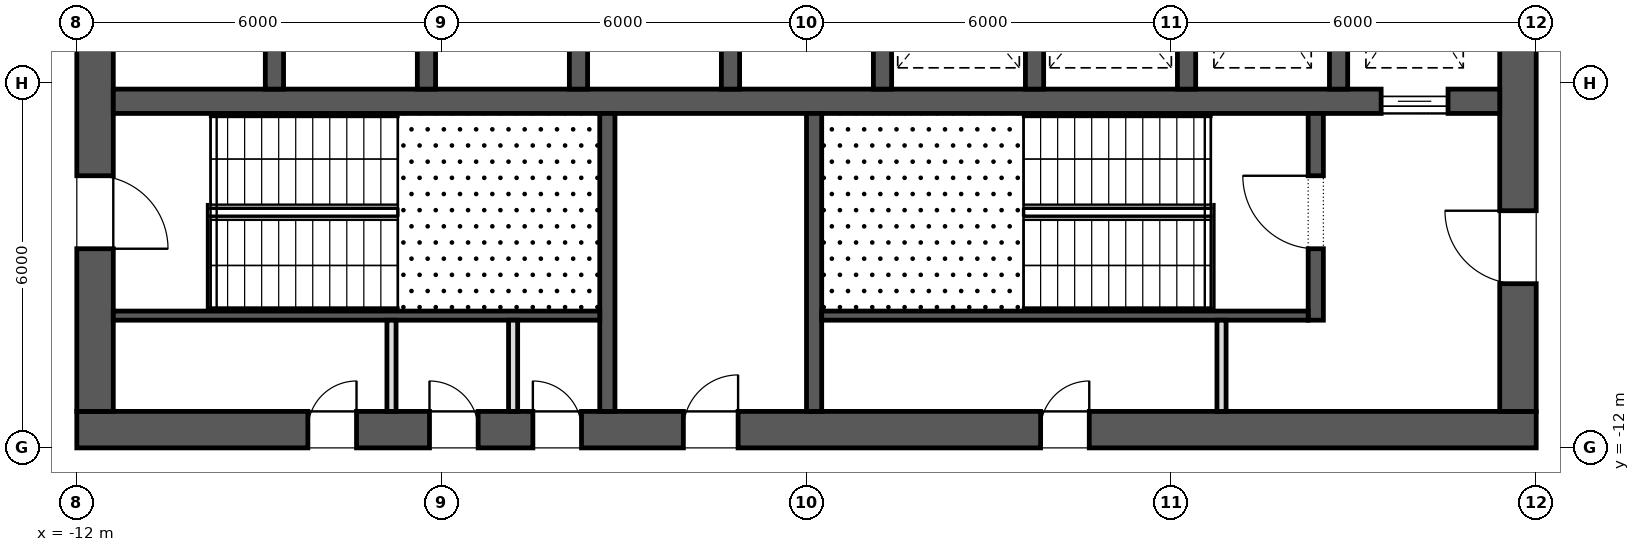
"""IFC4 building model, lengths in metres.
Left out: names, types, materials, properties, quantities, classifications, styles, units other than length and angle.
Written with IfcOpenShell. Run it as: python <this file> out.ifc"""

import sys

from ifc_helpers import new_model, si_unit, direction, frame, frame_2d, origin, place, context, subcontext, project, spatial, rectangle, extrude, element, fill, save


model = new_model("IFC4")
c1 = context("Model", 3, precision=1e-05, world=origin(), true_north=direction((0.0, 1.0)))
c2 = subcontext(c1, "Body", "Model", "MODEL_VIEW")
j1 = project(units=[si_unit("LENGTHUNIT", "METRE"), si_unit("PLANEANGLEUNIT", "RADIAN")], contexts=[c1])
p1 = place(None, origin())
s1 = spatial("IfcSite", under=j1, at=p1, CompositionType="ELEMENT")
p2 = place(p1, origin())
s2 = spatial("IfcBuilding", under=s1, at=p2, CompositionType="ELEMENT")
p3 = place(p2, frame((0.0, 0.0, 61.3)))
s3 = spatial("IfcBuildingStorey", under=s2, at=p3, CompositionType="ELEMENT", Elevation=61.3)
p4 = place(p3, frame((-12.0, -11.7, 0.0), z_axis=(0.0, 0.0, 1.0), x_axis=(1.0, 0.0, 0.0)))
e1 = element("IfcWall", 1, at=p4, inside=s3, PredefinedType="SHEAR", context=c2, shape_type="SweptSolid", body=[
    extrude(rectangle(XDim=24.0, YDim=0.6, at=frame_2d((12.0, 0.0))), origin(), (0.0, 0.0, 1.0), 4.2),
])
p5 = place(p4, frame((9.975, 0.0, 0.0)))
e2 = element("IfcOpeningElement", 2, at=p5, cuts=e1, PredefinedType="OPENING", context=c2, shape_type="SweptSolid", body=[
    extrude(rectangle(XDim=0.9, YDim=2.1, at=frame_2d((0.45, 1.05))), frame((0.0, 0.312, 0.0), z_axis=(0.0, -1.0, 0.0), x_axis=(1.0, 0.0, 0.0)), (0.0, 0.0, 1.0), 0.624),
])
p6 = place(p4, frame((3.8, 0.0, 0.0)))
e3 = element("IfcOpeningElement", 3, at=p6, cuts=e1, PredefinedType="OPENING", context=c2, shape_type="SweptSolid", body=[
    extrude(rectangle(XDim=0.8, YDim=2.1, at=frame_2d((0.4, 1.05))), frame((0.0, 0.312, 0.0), z_axis=(0.0, -1.0, 0.0), x_axis=(1.0, 0.0, 0.0)), (0.0, 0.0, 1.0), 0.624),
])
p7 = place(p4, frame((5.8, 0.0, 0.0)))
e4 = element("IfcOpeningElement", 4, at=p7, cuts=e1, PredefinedType="OPENING", context=c2, shape_type="SweptSolid", body=[
    extrude(rectangle(XDim=0.8, YDim=2.1, at=frame_2d((0.4, 1.05))), frame((0.0, 0.312, 0.0), z_axis=(0.0, -1.0, 0.0), x_axis=(1.0, 0.0, 0.0)), (0.0, 0.0, 1.0), 0.624),
])
p8 = place(p4, frame((7.5, 0.0, 0.0)))
e5 = element("IfcOpeningElement", 5, at=p8, cuts=e1, PredefinedType="OPENING", context=c2, shape_type="SweptSolid", body=[
    extrude(rectangle(XDim=0.8, YDim=2.1, at=frame_2d((0.4, 1.05))), frame((0.0, 0.312, 0.0), z_axis=(0.0, -1.0, 0.0), x_axis=(1.0, 0.0, 0.0)), (0.0, 0.0, 1.0), 0.624),
])
p9 = place(p4, frame((15.85, 0.0, 0.0)))
e6 = element("IfcOpeningElement", 6, at=p9, cuts=e1, PredefinedType="OPENING", context=c2, shape_type="SweptSolid", body=[
    extrude(rectangle(XDim=0.8, YDim=2.1, at=frame_2d((0.4, 1.05))), frame((0.0, 0.312, 0.0), z_axis=(0.0, -1.0, 0.0), x_axis=(1.0, 0.0, 0.0)), (0.0, 0.0, 1.0), 0.624),
])
p10 = place(p3, frame((11.7, -11.4, 0.0), z_axis=(0.0, 0.0, 1.0), x_axis=(0.0, 1.0, 0.0)))
e7 = element("IfcWall", 7, at=p10, inside=s3, PredefinedType="SHEAR", context=c2, shape_type="SweptSolid", body=[
    extrude(rectangle(XDim=22.8, YDim=0.6, at=frame_2d((11.4, 0.0))), origin(), (0.0, 0.0, 1.0), 4.2),
])
p11 = place(p10, frame((10.2, 0.0, 0.0)))
e8 = element("IfcOpeningElement", 8, at=p11, cuts=e7, PredefinedType="OPENING", context=c2, shape_type="SweptSolid", body=[
    extrude(rectangle(XDim=2.4, YDim=2.1, at=frame_2d((1.2, 1.05))), frame((0.0, 0.312, 0.0), z_axis=(0.0, -1.0, 0.0), x_axis=(1.0, 0.0, 0.0)), (0.0, 0.0, 1.0), 0.624),
])
p12 = place(p10, frame((19.5, 0.0, 0.0)))
e9 = element("IfcOpeningElement", 9, at=p12, cuts=e7, PredefinedType="OPENING", context=c2, shape_type="SweptSolid", body=[
    extrude(rectangle(XDim=1.2, YDim=2.1, at=frame_2d((0.6, 1.05))), frame((0.0, 0.312, 0.0), z_axis=(0.0, -1.0, 0.0), x_axis=(1.0, 0.0, 0.0)), (0.0, 0.0, 1.0), 0.624),
])
p13 = place(p10, frame((2.1, 0.0, 0.0)))
e10 = element("IfcOpeningElement", 10, at=p13, cuts=e7, PredefinedType="OPENING", context=c2, shape_type="SweptSolid", body=[
    extrude(rectangle(XDim=1.2, YDim=2.1, at=frame_2d((0.6, 1.05))), frame((0.0, 0.312, 0.0), z_axis=(0.0, -1.0, 0.0), x_axis=(1.0, 0.0, 0.0)), (0.0, 0.0, 1.0), 0.624),
])
p14 = place(p3, frame((-11.7, -11.4, 0.0), z_axis=(0.0, 0.0, 1.0), x_axis=(0.0, 1.0, 0.0)))
e11 = element("IfcWall", 11, at=p14, inside=s3, PredefinedType="SHEAR", context=c2, shape_type="SweptSolid", body=[
    extrude(rectangle(XDim=22.8, YDim=0.6, at=frame_2d((11.4, 0.0))), origin(), (0.0, 0.0, 1.0), 4.2),
])
p15 = place(p14, frame((10.2, 0.0, 0.0)))
e12 = element("IfcOpeningElement", 12, at=p15, cuts=e11, PredefinedType="OPENING", context=c2, shape_type="SweptSolid", body=[
    extrude(rectangle(XDim=2.4, YDim=2.1, at=frame_2d((1.2, 1.05))), frame((0.0, 0.312, 0.0), z_axis=(0.0, -1.0, 0.0), x_axis=(1.0, 0.0, 0.0)), (0.0, 0.0, 1.0), 0.624),
])
p16 = place(p14, frame((18.925, 0.0, 0.0)))
e13 = element("IfcOpeningElement", 13, at=p16, cuts=e11, PredefinedType="OPENING", context=c2, shape_type="SweptSolid", body=[
    extrude(rectangle(XDim=1.2, YDim=2.1, at=frame_2d((0.6, 1.05))), frame((0.0, 0.312, 0.0), z_axis=(0.0, -1.0, 0.0), x_axis=(1.0, 0.0, 0.0)), (0.0, 0.0, 1.0), 0.624),
])
p17 = place(p14, frame((2.675, 0.0, 0.0)))
e14 = element("IfcOpeningElement", 14, at=p17, cuts=e11, PredefinedType="OPENING", context=c2, shape_type="SweptSolid", body=[
    extrude(rectangle(XDim=1.2, YDim=2.1, at=frame_2d((0.6, 1.05))), frame((0.0, 0.312, 0.0), z_axis=(0.0, -1.0, 0.0), x_axis=(1.0, 0.0, 0.0)), (0.0, 0.0, 1.0), 0.624),
])
p18 = place(p3, frame((-11.4, -6.3, 0.0), z_axis=(0.0, 0.0, 1.0), x_axis=(1.0, 0.0, 0.0)))
e15 = element("IfcWall", 15, at=p18, inside=s3, PredefinedType="SHEAR", context=c2, shape_type="SweptSolid", body=[
    extrude(rectangle(XDim=22.8, YDim=0.4, at=frame_2d((11.4, 0.0))), origin(), (0.0, 0.0, 1.0), 4.2),
])
p19 = place(p18, frame((20.85, 0.0, 0.0)))
e16 = element("IfcOpeningElement", 16, at=p19, cuts=e15, PredefinedType="OPENING", context=c2, shape_type="SweptSolid", body=[
    extrude(rectangle(XDim=1.1, YDim=2.1, at=frame_2d((0.55, 1.05))), frame((0.0, 0.212, 0.0), z_axis=(0.0, -1.0, 0.0), x_axis=(1.0, 0.0, 0.0)), (0.0, 0.0, 1.0), 0.424),
])
for number, where, z_axis, x_axis in (
    (17, (-8.75, -6.1, 0.0), (0.0, 0.0, 1.0), (0.0, 1.0, 0.0)),
    (18, (-6.25, -6.1, 0.0), (0.0, 0.0, 1.0), (0.0, 1.0, 0.0)),
    (19, (-3.75, -6.1, 0.0), (0.0, 0.0, 1.0), (0.0, 1.0, 0.0)),
    (20, (-1.25, -6.1, 0.0), (0.0, 0.0, 1.0), (0.0, 1.0, 0.0)),
    (21, (1.25, -6.1, 0.0), (0.0, 0.0, 1.0), (0.0, 1.0, 0.0)),
    (22, (3.75, -6.1, 0.0), (0.0, 0.0, 1.0), (0.0, 1.0, 0.0)),
    (23, (6.25, -6.1, 0.0), (0.0, 0.0, 1.0), (0.0, 1.0, 0.0)),
    (24, (8.75, -6.1, 0.0), (0.0, 0.0, 1.0), (0.0, 1.0, 0.0)),
):
    element("IfcWall", number, at=place(p3, frame(where, z_axis=z_axis, x_axis=x_axis)), inside=s3, PredefinedType="SHEAR", context=c2, shape_type="SweptSolid", body=[
        extrude(rectangle(XDim=2.9, YDim=0.3, at=frame_2d((1.45, 0.0))), origin(), (0.0, 0.0, 1.0), 4.2),
    ])
for number, where, z_axis, x_axis in (
    (25, (-3.275, -11.4, 0.0), (0.0, 0.0, 1.0), (0.0, 1.0, 0.0)),
    (26, (0.125, -11.4, 0.0), (0.0, 0.0, 1.0), (0.0, 1.0, 0.0)),
):
    element("IfcWall", number, at=place(p3, frame(where, z_axis=z_axis, x_axis=x_axis)), inside=s3, PredefinedType="SHEAR", context=c2, shape_type="SweptSolid", body=[
        extrude(rectangle(XDim=4.9, YDim=0.25, at=frame_2d((2.45, 0.0))), origin(), (0.0, 0.0, 1.0), 3.9),
    ])
p20 = place(p3, frame((8.375, -9.9, 0.0), z_axis=(0.0, 0.0, 1.0), x_axis=(0.0, 1.0, 0.0)))
e27 = element("IfcWall", 27, at=p20, inside=s3, PredefinedType="SHEAR", context=c2, shape_type="SweptSolid", body=[
    extrude(rectangle(XDim=3.4, YDim=0.25, at=frame_2d((1.7, 0.0))), origin(), (0.0, 0.0, 1.0), 3.9),
])
p21 = place(p20, frame((1.175, 0.0, 0.0)))
e28 = element("IfcOpeningElement", 28, at=p21, cuts=e27, PredefinedType="OPENING", context=c2, shape_type="SweptSolid", body=[
    extrude(rectangle(XDim=1.2, YDim=2.1, at=frame_2d((0.6, 1.05))), frame((0.0, 0.137, 0.0), z_axis=(0.0, -1.0, 0.0), x_axis=(1.0, 0.0, 0.0)), (0.0, 0.0, 1.0), 0.274),
])
for number, where, z_axis, x_axis in (
    (29, (-11.4, -9.825, 0.0), (0.0, 0.0, 1.0), (1.0, 0.0, 0.0)),
    (30, (0.25, -9.825, 0.0), (0.0, 0.0, 1.0), (1.0, 0.0, 0.0)),
):
    element("IfcWall", number, at=place(p3, frame(where, z_axis=z_axis, x_axis=x_axis)), inside=s3, PredefinedType="SHEAR", context=c2, shape_type="SweptSolid", body=[
        extrude(rectangle(XDim=8.0, YDim=0.15, at=frame_2d((4.0, 0.0))), origin(), (0.0, 0.0, 1.0), 3.9),
    ])
for number, where, z_axis, x_axis in (
    (31, (-6.825, -11.4, 0.0), (0.0, 0.0, 1.0), (0.0, 1.0, 0.0)),
    (32, (-4.825, -11.4, 0.0), (0.0, 0.0, 1.0), (0.0, 1.0, 0.0)),
    (33, (6.825, -11.4, 0.0), (0.0, 0.0, 1.0), (0.0, 1.0, 0.0)),
):
    element("IfcWall", number, at=place(p3, frame(where, z_axis=z_axis, x_axis=x_axis)), inside=s3, PredefinedType="PARTITIONING", context=c2, shape_type="SweptSolid", body=[
        extrude(rectangle(XDim=1.5, YDim=0.15, at=frame_2d((0.75, 0.0))), origin(), (0.0, 0.0, 1.0), 3.9),
    ])
p22 = place(p19, origin())
e34 = element("IfcDoor", 34, at=p22, inside=s3, OperationType="SLIDING_TO_LEFT", PredefinedType="DOOR", context=c2, shape_type="SweptSolid", body=[
    extrude(rectangle(XDim=1.1, YDim=2.1, at=frame_2d((0.55, 1.05))), frame((0.0, 0.025, 0.0), z_axis=(0.0, -1.0, 0.0), x_axis=(1.0, 0.0, 0.0)), (0.0, 0.0, 1.0), 0.05),
])
fill(e16, e34)
p23 = place(p17, frame((1.2, 0.0, 0.0), z_axis=(0.0, 0.0, 1.0), x_axis=(-1.0, 0.0, 0.0)))
e35 = element("IfcDoor", 35, at=p23, inside=s3, OperationType="SINGLE_SWING_LEFT", PredefinedType="DOOR", context=c2, shape_type="SweptSolid", body=[
    extrude(rectangle(XDim=1.2, YDim=2.1, at=frame_2d((0.6, 1.05))), frame((0.0, 0.025, 0.0), z_axis=(0.0, -1.0, 0.0), x_axis=(1.0, 0.0, 0.0)), (0.0, 0.0, 1.0), 0.05),
])
fill(e14, e35)
p24 = place(p21, origin())
e36 = element("IfcDoor", 36, at=p24, inside=s3, OperationType="SINGLE_SWING_LEFT", PredefinedType="DOOR", context=c2, shape_type="SweptSolid", body=[
    extrude(rectangle(XDim=1.2, YDim=2.1, at=frame_2d((0.6, 1.05))), frame((0.0, 0.025, 0.0), z_axis=(0.0, -1.0, 0.0), x_axis=(1.0, 0.0, 0.0)), (0.0, 0.0, 1.0), 0.05),
])
fill(e28, e36)
p25 = place(p13, origin())
e37 = element("IfcDoor", 37, at=p25, inside=s3, OperationType="SINGLE_SWING_LEFT", PredefinedType="DOOR", context=c2, shape_type="SweptSolid", body=[
    extrude(rectangle(XDim=1.2, YDim=2.1, at=frame_2d((0.6, 1.05))), frame((0.0, 0.025, 0.0), z_axis=(0.0, -1.0, 0.0), x_axis=(1.0, 0.0, 0.0)), (0.0, 0.0, 1.0), 0.05),
])
fill(e10, e37)
p26 = place(p5, origin())
e38 = element("IfcDoor", 38, at=p26, inside=s3, OperationType="SINGLE_SWING_LEFT", PredefinedType="DOOR", context=c2, shape_type="SweptSolid", body=[
    extrude(rectangle(XDim=0.9, YDim=2.1, at=frame_2d((0.45, 1.05))), frame((0.0, 0.025, 0.0), z_axis=(0.0, -1.0, 0.0), x_axis=(1.0, 0.0, 0.0)), (0.0, 0.0, 1.0), 0.05),
])
fill(e2, e38)
p27 = place(p6, origin())
e39 = element("IfcDoor", 39, at=p27, inside=s3, OperationType="SINGLE_SWING_LEFT", PredefinedType="DOOR", context=c2, shape_type="SweptSolid", body=[
    extrude(rectangle(XDim=0.8, YDim=2.1, at=frame_2d((0.4, 1.05))), frame((0.0, 0.025, 0.0), z_axis=(0.0, -1.0, 0.0), x_axis=(1.0, 0.0, 0.0)), (0.0, 0.0, 1.0), 0.05),
])
fill(e3, e39)
p28 = place(p7, origin())
e40 = element("IfcDoor", 40, at=p28, inside=s3, OperationType="SINGLE_SWING_RIGHT", PredefinedType="DOOR", context=c2, shape_type="SweptSolid", body=[
    extrude(rectangle(XDim=0.8, YDim=2.1, at=frame_2d((0.4, 1.05))), frame((0.0, 0.025, 0.0), z_axis=(0.0, -1.0, 0.0), x_axis=(1.0, 0.0, 0.0)), (0.0, 0.0, 1.0), 0.05),
])
fill(e4, e40)
p29 = place(p8, origin())
e41 = element("IfcDoor", 41, at=p29, inside=s3, OperationType="SINGLE_SWING_RIGHT", PredefinedType="DOOR", context=c2, shape_type="SweptSolid", body=[
    extrude(rectangle(XDim=0.8, YDim=2.1, at=frame_2d((0.4, 1.05))), frame((0.0, 0.025, 0.0), z_axis=(0.0, -1.0, 0.0), x_axis=(1.0, 0.0, 0.0)), (0.0, 0.0, 1.0), 0.05),
])
fill(e5, e41)
p30 = place(p9, origin())
e42 = element("IfcDoor", 42, at=p30, inside=s3, OperationType="SINGLE_SWING_LEFT", PredefinedType="DOOR", context=c2, shape_type="SweptSolid", body=[
    extrude(rectangle(XDim=0.8, YDim=2.1, at=frame_2d((0.4, 1.05))), frame((0.0, 0.025, 0.0), z_axis=(0.0, -1.0, 0.0), x_axis=(1.0, 0.0, 0.0)), (0.0, 0.0, 1.0), 0.05),
])
fill(e6, e42)
save(model, sys.argv[1])
